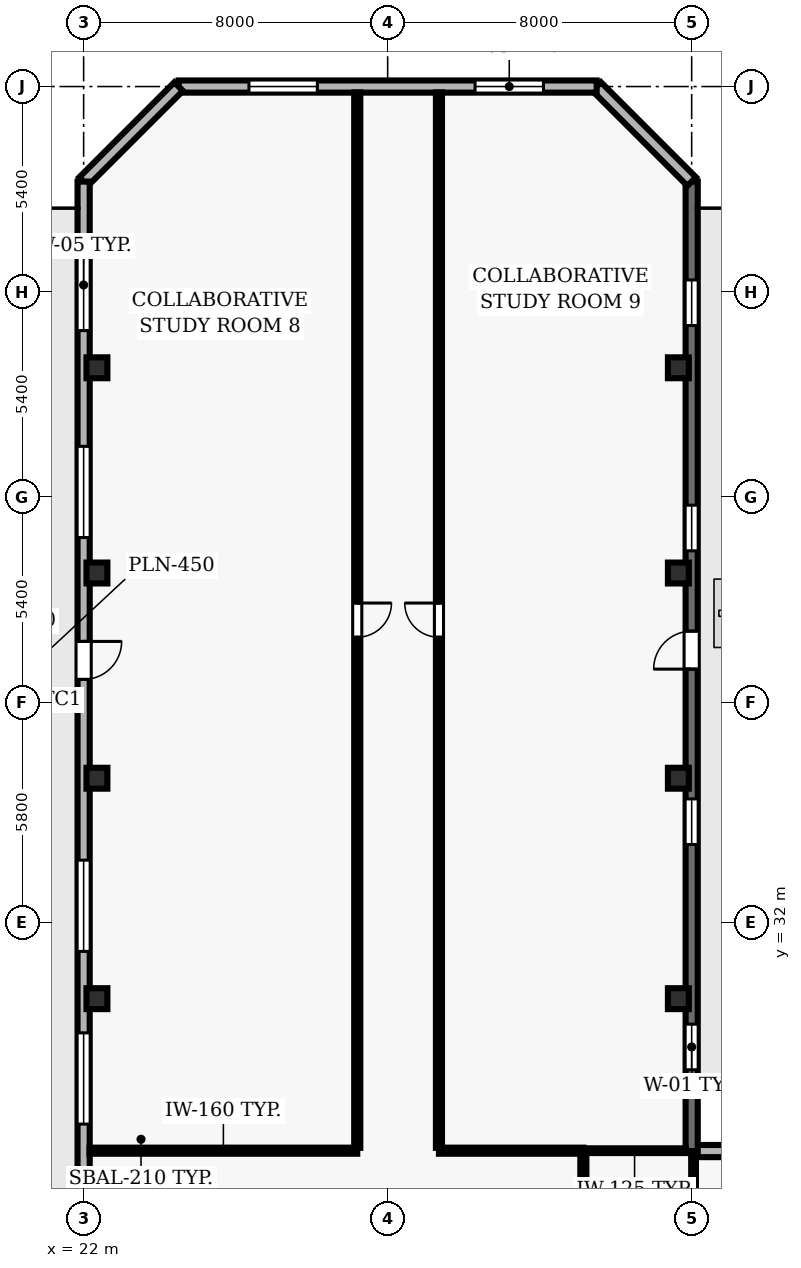
"""IFC4 building model, lengths in metres.
Left out: names, types, materials, properties, quantities, classifications, styles, units other than length and angle.
Written with IfcOpenShell. Run it as: python <this file> out.ifc"""

import sys

from ifc_helpers import new_model, si_unit, direction, frame, frame_2d, origin, origin_2d, place, context, subcontext, project, spatial, rectangle, hollow_rectangle, extrude, element, fill, save


model = new_model("IFC4")
c1 = context("Model", 3, precision=1e-05, world=origin(), true_north=direction((0.0, 1.0)))
c2 = subcontext(c1, "Body", "Model", "MODEL_VIEW")
j1 = project(units=[si_unit("LENGTHUNIT", "METRE"), si_unit("PLANEANGLEUNIT", "RADIAN")], contexts=[c1])
p1 = place(None, origin())
s1 = spatial("IfcSite", under=j1, at=p1, CompositionType="ELEMENT")
p2 = place(p1, origin())
s2 = spatial("IfcBuilding", under=s1, at=p2, CompositionType="ELEMENT")
p3 = place(p2, frame((0.0, 0.0, 70.0)))
s3 = spatial("IfcBuildingStorey", under=s2, at=p3, CompositionType="ELEMENT", Elevation=70.0)
for number, where, z_axis, x_axis in (
    (1, (22.35, 30.0, 0.0), (0.0, 0.0, 1.0), (1.0, 0.0, 0.0)),
    (2, (37.65, 30.0, 0.0), (0.0, 0.0, 1.0), (1.0, 0.0, 0.0)),
    (3, (22.35, 35.8, 0.0), (0.0, 0.0, 1.0), (1.0, 0.0, 0.0)),
    (4, (37.65, 35.8, 0.0), (0.0, 0.0, 1.0), (1.0, 0.0, 0.0)),
    (5, (22.35, 41.2, 0.0), (0.0, 0.0, 1.0), (1.0, 0.0, 0.0)),
    (6, (37.65, 41.2, 0.0), (0.0, 0.0, 1.0), (1.0, 0.0, 0.0)),
    (7, (22.35, 46.6, 0.0), (0.0, 0.0, 1.0), (1.0, 0.0, 0.0)),
    (8, (37.65, 46.6, 0.0), (0.0, 0.0, 1.0), (1.0, 0.0, 0.0)),
):
    element("IfcColumn", number, at=place(p3, frame(where, z_axis=z_axis, x_axis=x_axis)), inside=s3, PredefinedType="COLUMN", context=c2, shape_type="SweptSolid", body=[
        extrude(hollow_rectangle(XDim=0.55, YDim=0.55, WallThickness=0.025, at=origin_2d()), origin(), (0.0, 0.0, 1.0), 3.9),
    ])
p4 = place(p3, frame((48.5, 25.99, 0.0), z_axis=(0.0, 0.0, 1.0), x_axis=(-1.0, 0.0, 0.0)))
e9 = element("IfcWall", 9, at=p4, inside=s3, PredefinedType="SOLIDWALL", context=c2, shape_type="SweptSolid", body=[
    extrude(rectangle(XDim=10.5, YDim=0.32, at=frame_2d((5.25, 0.0))), origin(), (0.0, 0.0, 1.0), 3.69),
])
p5 = place(p4, frame((3.75, 0.0, 0.9)))
e10 = element("IfcOpeningElement", 10, at=p5, cuts=e9, PredefinedType="OPENING", context=c2, shape_type="SweptSolid", body=[
    extrude(rectangle(XDim=3.0, YDim=2.2, at=frame_2d((1.5, 1.1))), frame((0.0, 0.17, 0.0), z_axis=(0.0, -1.0, 0.0), x_axis=(1.0, 0.0, 0.0)), (0.0, 0.0, 1.0), 0.34),
])
p6 = place(p3, frame((38.0, 25.99, 0.0), z_axis=(0.0, 0.0, 1.0), x_axis=(0.0, 1.0, 0.0)))
e11 = element("IfcWall", 11, at=p6, inside=s3, PredefinedType="SOLIDWALL", context=c2, shape_type="SweptSolid", body=[
    extrude(rectangle(XDim=25.51, YDim=0.32, at=frame_2d((12.755, 0.0))), origin(), (0.0, 0.0, 1.0), 3.69),
])
p7 = place(p6, frame((12.681, 0.0, 0.0)))
e12 = element("IfcOpeningElement", 12, at=p7, cuts=e11, PredefinedType="OPENING", context=c2, shape_type="SweptSolid", body=[
    extrude(rectangle(XDim=1.0, YDim=2.2, at=frame_2d((0.5, 1.1))), frame((0.0, 0.17, 0.0), z_axis=(0.0, -1.0, 0.0), x_axis=(1.0, 0.0, 0.0)), (0.0, 0.0, 1.0), 0.34),
])
p8 = place(p6, frame((2.139, 0.0, 0.9)))
e13 = element("IfcOpeningElement", 13, at=p8, cuts=e11, PredefinedType="OPENING", context=c2, shape_type="SweptSolid", body=[
    extrude(rectangle(XDim=1.2, YDim=1.6, at=frame_2d((0.6, 0.8))), frame((0.0, 0.17, 0.0), z_axis=(0.0, -1.0, 0.0), x_axis=(1.0, 0.0, 0.0)), (0.0, 0.0, 1.0), 0.34),
])
p9 = place(p6, frame((8.066, 0.0, 0.9)))
e14 = element("IfcOpeningElement", 14, at=p9, cuts=e11, PredefinedType="OPENING", context=c2, shape_type="SweptSolid", body=[
    extrude(rectangle(XDim=1.2, YDim=1.6, at=frame_2d((0.6, 0.8))), frame((0.0, 0.17, 0.0), z_axis=(0.0, -1.0, 0.0), x_axis=(1.0, 0.0, 0.0)), (0.0, 0.0, 1.0), 0.34),
])
p10 = place(p6, frame((15.794, 0.0, 0.9)))
e15 = element("IfcOpeningElement", 15, at=p10, cuts=e11, PredefinedType="OPENING", context=c2, shape_type="SweptSolid", body=[
    extrude(rectangle(XDim=1.2, YDim=1.6, at=frame_2d((0.6, 0.8))), frame((0.0, 0.17, 0.0), z_axis=(0.0, -1.0, 0.0), x_axis=(1.0, 0.0, 0.0)), (0.0, 0.0, 1.0), 0.34),
])
p11 = place(p6, frame((21.721, 0.0, 0.9)))
e16 = element("IfcOpeningElement", 16, at=p11, cuts=e11, PredefinedType="OPENING", context=c2, shape_type="SweptSolid", body=[
    extrude(rectangle(XDim=1.2, YDim=1.6, at=frame_2d((0.6, 0.8))), frame((0.0, 0.17, 0.0), z_axis=(0.0, -1.0, 0.0), x_axis=(1.0, 0.0, 0.0)), (0.0, 0.0, 1.0), 0.34),
])
p12 = place(p3, frame((38.0, 51.5, 0.0), z_axis=(0.0, 0.0, 1.0), x_axis=(-0.707106781187, 0.707106781187, 0.0)))
e17 = element("IfcWall", 17, at=p12, inside=s3, PredefinedType="SOLIDWALL", context=c2, shape_type="SweptSolid", body=[
    extrude(rectangle(XDim=3.536, YDim=0.32, at=frame_2d((1.768, 0.0))), origin(), (0.0, 0.0, 1.0), 3.69),
])
p13 = place(p3, frame((35.5, 54.0, 0.0), z_axis=(0.0, 0.0, 1.0), x_axis=(-1.0, 0.0, 0.0)))
e18 = element("IfcWall", 18, at=p13, inside=s3, PredefinedType="SOLIDWALL", context=c2, shape_type="SweptSolid", body=[
    extrude(rectangle(XDim=11.0, YDim=0.32, at=frame_2d((5.5, 0.0))), origin(), (0.0, 0.0, 1.0), 3.69),
])
p14 = place(p13, frame((1.4, 0.0, 0.9)))
e19 = element("IfcOpeningElement", 19, at=p14, cuts=e18, PredefinedType="OPENING", context=c2, shape_type="SweptSolid", body=[
    extrude(rectangle(XDim=1.8, YDim=1.6, at=frame_2d((0.9, 0.8))), frame((0.0, 0.17, 0.0), z_axis=(0.0, -1.0, 0.0), x_axis=(1.0, 0.0, 0.0)), (0.0, 0.0, 1.0), 0.34),
])
p15 = place(p13, frame((7.35, 0.0, 0.9)))
e20 = element("IfcOpeningElement", 20, at=p15, cuts=e18, PredefinedType="OPENING", context=c2, shape_type="SweptSolid", body=[
    extrude(rectangle(XDim=1.8, YDim=1.6, at=frame_2d((0.9, 0.8))), frame((0.0, 0.17, 0.0), z_axis=(0.0, -1.0, 0.0), x_axis=(1.0, 0.0, 0.0)), (0.0, 0.0, 1.0), 0.34),
])
p16 = place(p3, frame((24.5, 54.0, 0.0), z_axis=(0.0, 0.0, 1.0), x_axis=(-0.707106781187, -0.707106781187, 0.0)))
e21 = element("IfcWall", 21, at=p16, inside=s3, PredefinedType="SOLIDWALL", context=c2, shape_type="SweptSolid", body=[
    extrude(rectangle(XDim=3.536, YDim=0.32, at=frame_2d((1.768, 0.0))), origin(), (0.0, 0.0, 1.0), 3.69),
])
p17 = place(p3, frame((22.0, 51.5, 0.0), z_axis=(0.0, 0.0, 1.0), x_axis=(0.0, -1.0, 0.0)))
e22 = element("IfcWall", 22, at=p17, inside=s3, PredefinedType="SOLIDWALL", context=c2, shape_type="SweptSolid", body=[
    extrude(rectangle(XDim=49.0, YDim=0.32, at=frame_2d((24.5, 0.0))), origin(), (0.0, 0.0, 1.0), 3.69),
])
p18 = place(p17, frame((12.1, 0.0, 0.0)))
e23 = element("IfcOpeningElement", 23, at=p18, cuts=e22, PredefinedType="OPENING", context=c2, shape_type="SweptSolid", body=[
    extrude(rectangle(XDim=1.0, YDim=2.2, at=frame_2d((0.5, 1.1))), frame((0.0, 0.17, 0.0), z_axis=(0.0, -1.0, 0.0), x_axis=(1.0, 0.0, 0.0)), (0.0, 0.0, 1.0), 0.34),
])
p19 = place(p17, frame((1.522, 0.0, 0.9)))
e24 = element("IfcOpeningElement", 24, at=p19, cuts=e22, PredefinedType="OPENING", context=c2, shape_type="SweptSolid", body=[
    extrude(rectangle(XDim=2.4, YDim=1.6, at=frame_2d((1.2, 0.8))), frame((0.0, 0.17, 0.0), z_axis=(0.0, -1.0, 0.0), x_axis=(1.0, 0.0, 0.0)), (0.0, 0.0, 1.0), 0.34),
])
p20 = place(p17, frame((6.967, 0.0, 0.9)))
e25 = element("IfcOpeningElement", 25, at=p20, cuts=e22, PredefinedType="OPENING", context=c2, shape_type="SweptSolid", body=[
    extrude(rectangle(XDim=2.4, YDim=1.6, at=frame_2d((1.2, 0.8))), frame((0.0, 0.17, 0.0), z_axis=(0.0, -1.0, 0.0), x_axis=(1.0, 0.0, 0.0)), (0.0, 0.0, 1.0), 0.34),
])
p21 = place(p17, frame((17.856, 0.0, 0.9)))
e26 = element("IfcOpeningElement", 26, at=p21, cuts=e22, PredefinedType="OPENING", context=c2, shape_type="SweptSolid", body=[
    extrude(rectangle(XDim=2.4, YDim=1.6, at=frame_2d((1.2, 0.8))), frame((0.0, 0.17, 0.0), z_axis=(0.0, -1.0, 0.0), x_axis=(1.0, 0.0, 0.0)), (0.0, 0.0, 1.0), 0.34),
])
p22 = place(p17, frame((22.4, 0.0, 0.9)))
e27 = element("IfcOpeningElement", 27, at=p22, cuts=e22, PredefinedType="OPENING", context=c2, shape_type="SweptSolid", body=[
    extrude(rectangle(XDim=2.4, YDim=1.6, at=frame_2d((1.2, 0.8))), frame((0.0, 0.17, 0.0), z_axis=(0.0, -1.0, 0.0), x_axis=(1.0, 0.0, 0.0)), (0.0, 0.0, 1.0), 0.34),
])
p23 = place(p17, frame((29.194, 0.0, 0.9)))
e28 = element("IfcOpeningElement", 28, at=p23, cuts=e22, PredefinedType="OPENING", context=c2, shape_type="SweptSolid", body=[
    extrude(rectangle(XDim=2.4, YDim=1.6, at=frame_2d((1.2, 0.8))), frame((0.0, 0.17, 0.0), z_axis=(0.0, -1.0, 0.0), x_axis=(1.0, 0.0, 0.0)), (0.0, 0.0, 1.0), 0.34),
])
p24 = place(p17, frame((33.289, 0.0, 0.9)))
e29 = element("IfcOpeningElement", 29, at=p24, cuts=e22, PredefinedType="OPENING", context=c2, shape_type="SweptSolid", body=[
    extrude(rectangle(XDim=2.4, YDim=1.6, at=frame_2d((1.2, 0.8))), frame((0.0, 0.17, 0.0), z_axis=(0.0, -1.0, 0.0), x_axis=(1.0, 0.0, 0.0)), (0.0, 0.0, 1.0), 0.34),
])
p25 = place(p17, frame((39.633, 0.0, 0.9)))
e30 = element("IfcOpeningElement", 30, at=p25, cuts=e22, PredefinedType="OPENING", context=c2, shape_type="SweptSolid", body=[
    extrude(rectangle(XDim=2.4, YDim=1.6, at=frame_2d((1.2, 0.8))), frame((0.0, 0.17, 0.0), z_axis=(0.0, -1.0, 0.0), x_axis=(1.0, 0.0, 0.0)), (0.0, 0.0, 1.0), 0.34),
])
p26 = place(p3, frame((29.2, 26.0, 0.0), z_axis=(0.0, 0.0, 1.0), x_axis=(-1.0, 0.0, 0.0)))
e31 = element("IfcWall", 31, at=p26, inside=s3, PredefinedType="PARTITIONING", context=c2, shape_type="SweptSolid", body=[
    extrude(rectangle(XDim=7.045, YDim=0.16, at=frame_2d((3.522, 0.0))), origin(), (0.0, 0.0, 1.0), 3.69),
])
p27 = place(p3, frame((35.15, 26.0, 0.0), z_axis=(0.0, 0.0, 1.0), x_axis=(-1.0, 0.0, 0.0)))
e32 = element("IfcWall", 32, at=p27, inside=s3, PredefinedType="PARTITIONING", context=c2, shape_type="SweptSolid", body=[
    extrude(rectangle(XDim=3.8, YDim=0.16, at=frame_2d((1.9, 0.0))), origin(), (0.0, 0.0, 1.0), 3.69),
])
p28 = place(p3, frame((35.15, 26.0, 0.0), z_axis=(0.0, 0.0, 1.0), x_axis=(1.0, 0.0, 0.0)))
e33 = element("IfcWall", 33, at=p28, inside=s3, PredefinedType="PARTITIONING", context=c2, shape_type="SweptSolid", body=[
    extrude(rectangle(XDim=2.695, YDim=0.125, at=frame_2d((1.348, 0.0))), origin(), (0.0, 0.0, 1.0), 3.69),
])
p29 = place(p3, frame((29.2, 53.845, 0.0), z_axis=(0.0, 0.0, 1.0), x_axis=(0.0, -1.0, 0.0)))
e34 = element("IfcWall", 34, at=p29, inside=s3, PredefinedType="PARTITIONING", context=c2, shape_type="SweptSolid", body=[
    extrude(rectangle(XDim=27.77, YDim=0.16, at=frame_2d((13.885, 0.0))), origin(), (0.0, 0.0, 1.0), 3.69),
])
p30 = place(p29, frame((13.435, 0.0, 0.0)))
e35 = element("IfcOpeningElement", 35, at=p30, cuts=e34, PredefinedType="OPENING", context=c2, shape_type="SweptSolid", body=[
    extrude(rectangle(XDim=0.9, YDim=2.1, at=frame_2d((0.45, 1.05))), frame((0.0, 0.09, 0.0), z_axis=(0.0, -1.0, 0.0), x_axis=(1.0, 0.0, 0.0)), (0.0, 0.0, 1.0), 0.18),
])
p31 = place(p3, frame((31.35, 26.075, 0.0), z_axis=(0.0, 0.0, 1.0), x_axis=(0.0, 1.0, 0.0)))
e36 = element("IfcWall", 36, at=p31, inside=s3, PredefinedType="PARTITIONING", context=c2, shape_type="SweptSolid", body=[
    extrude(rectangle(XDim=27.77, YDim=0.16, at=frame_2d((13.885, 0.0))), origin(), (0.0, 0.0, 1.0), 3.69),
])
p32 = place(p31, frame((13.435, 0.0, 0.0)))
e37 = element("IfcOpeningElement", 37, at=p32, cuts=e36, PredefinedType="OPENING", context=c2, shape_type="SweptSolid", body=[
    extrude(rectangle(XDim=0.9, YDim=2.1, at=frame_2d((0.45, 1.05))), frame((0.0, 0.09, 0.0), z_axis=(0.0, -1.0, 0.0), x_axis=(1.0, 0.0, 0.0)), (0.0, 0.0, 1.0), 0.18),
])
p33 = place(p3, frame((35.15, 24.07, 0.0), z_axis=(0.0, 0.0, 1.0), x_axis=(0.0, 1.0, 0.0)))
e38 = element("IfcWall", 38, at=p33, inside=s3, PredefinedType="PARTITIONING", context=c2, shape_type="SweptSolid", body=[
    extrude(rectangle(XDim=1.855, YDim=0.16, at=frame_2d((0.927, 0.0))), origin(), (0.0, 0.0, 1.0), 3.69),
])
p34 = place(p3, frame((38.05, 25.835, 0.0), z_axis=(0.0, 0.0, 1.0), x_axis=(0.0, -1.0, 0.0)))
e39 = element("IfcWall", 39, at=p34, inside=s3, PredefinedType="PARTITIONING", context=c2, shape_type="SweptSolid", body=[
    extrude(rectangle(XDim=1.785, YDim=0.125, at=frame_2d((0.893, 0.0))), origin(), (0.0, 0.0, 1.0), 2.995),
])
p35 = place(p7, origin())
e40 = element("IfcDoor", 40, at=p35, inside=s3, OperationType="SINGLE_SWING_LEFT", PredefinedType="DOOR", context=c2, shape_type="SweptSolid", body=[
    extrude(rectangle(XDim=1.0, YDim=2.2, at=frame_2d((0.5, 1.1))), frame((0.0, 0.025, 0.0), z_axis=(0.0, -1.0, 0.0), x_axis=(1.0, 0.0, 0.0)), (0.0, 0.0, 1.0), 0.05),
])
fill(e12, e40)
p36 = place(p8, origin())
e41 = element("IfcWindow", 41, at=p36, inside=s3, PartitioningType="SINGLE_PANEL", PredefinedType="WINDOW", context=c2, shape_type="SweptSolid", body=[
    extrude(rectangle(XDim=1.2, YDim=1.6, at=frame_2d((0.6, 0.8))), frame((0.0, 0.03, 0.0), z_axis=(0.0, -1.0, 0.0), x_axis=(1.0, 0.0, 0.0)), (0.0, 0.0, 1.0), 0.06),
])
fill(e13, e41)
p37 = place(p9, origin())
e42 = element("IfcWindow", 42, at=p37, inside=s3, PartitioningType="SINGLE_PANEL", PredefinedType="WINDOW", context=c2, shape_type="SweptSolid", body=[
    extrude(rectangle(XDim=1.2, YDim=1.6, at=frame_2d((0.6, 0.8))), frame((0.0, 0.03, 0.0), z_axis=(0.0, -1.0, 0.0), x_axis=(1.0, 0.0, 0.0)), (0.0, 0.0, 1.0), 0.06),
])
fill(e14, e42)
p38 = place(p10, origin())
e43 = element("IfcWindow", 43, at=p38, inside=s3, PartitioningType="SINGLE_PANEL", PredefinedType="WINDOW", context=c2, shape_type="SweptSolid", body=[
    extrude(rectangle(XDim=1.2, YDim=1.6, at=frame_2d((0.6, 0.8))), frame((0.0, 0.03, 0.0), z_axis=(0.0, -1.0, 0.0), x_axis=(1.0, 0.0, 0.0)), (0.0, 0.0, 1.0), 0.06),
])
fill(e15, e43)
p39 = place(p11, origin())
e44 = element("IfcWindow", 44, at=p39, inside=s3, PartitioningType="SINGLE_PANEL", PredefinedType="WINDOW", context=c2, shape_type="SweptSolid", body=[
    extrude(rectangle(XDim=1.2, YDim=1.6, at=frame_2d((0.6, 0.8))), frame((0.0, 0.03, 0.0), z_axis=(0.0, -1.0, 0.0), x_axis=(1.0, 0.0, 0.0)), (0.0, 0.0, 1.0), 0.06),
])
fill(e16, e44)
p40 = place(p14, origin())
e45 = element("IfcWindow", 45, at=p40, inside=s3, PartitioningType="SINGLE_PANEL", PredefinedType="WINDOW", context=c2, shape_type="SweptSolid", body=[
    extrude(rectangle(XDim=1.8, YDim=1.6, at=frame_2d((0.9, 0.8))), frame((0.0, 0.03, 0.0), z_axis=(0.0, -1.0, 0.0), x_axis=(1.0, 0.0, 0.0)), (0.0, 0.0, 1.0), 0.06),
])
fill(e19, e45)
p41 = place(p15, origin())
e46 = element("IfcWindow", 46, at=p41, inside=s3, PartitioningType="SINGLE_PANEL", PredefinedType="WINDOW", context=c2, shape_type="SweptSolid", body=[
    extrude(rectangle(XDim=1.8, YDim=1.6, at=frame_2d((0.9, 0.8))), frame((0.0, 0.03, 0.0), z_axis=(0.0, -1.0, 0.0), x_axis=(1.0, 0.0, 0.0)), (0.0, 0.0, 1.0), 0.06),
])
fill(e20, e46)
p42 = place(p18, origin())
e47 = element("IfcDoor", 47, at=p42, inside=s3, OperationType="SINGLE_SWING_LEFT", PredefinedType="DOOR", context=c2, shape_type="SweptSolid", body=[
    extrude(rectangle(XDim=1.0, YDim=2.2, at=frame_2d((0.5, 1.1))), frame((0.0, 0.025, 0.0), z_axis=(0.0, -1.0, 0.0), x_axis=(1.0, 0.0, 0.0)), (0.0, 0.0, 1.0), 0.05),
])
fill(e23, e47)
p43 = place(p19, origin())
e48 = element("IfcWindow", 48, at=p43, inside=s3, PartitioningType="SINGLE_PANEL", PredefinedType="WINDOW", context=c2, shape_type="SweptSolid", body=[
    extrude(rectangle(XDim=2.4, YDim=1.6, at=frame_2d((1.2, 0.8))), frame((0.0, 0.03, 0.0), z_axis=(0.0, -1.0, 0.0), x_axis=(1.0, 0.0, 0.0)), (0.0, 0.0, 1.0), 0.06),
])
fill(e24, e48)
p44 = place(p20, origin())
e49 = element("IfcWindow", 49, at=p44, inside=s3, PartitioningType="SINGLE_PANEL", PredefinedType="WINDOW", context=c2, shape_type="SweptSolid", body=[
    extrude(rectangle(XDim=2.4, YDim=1.6, at=frame_2d((1.2, 0.8))), frame((0.0, 0.03, 0.0), z_axis=(0.0, -1.0, 0.0), x_axis=(1.0, 0.0, 0.0)), (0.0, 0.0, 1.0), 0.06),
])
fill(e25, e49)
p45 = place(p21, origin())
e50 = element("IfcWindow", 50, at=p45, inside=s3, PartitioningType="SINGLE_PANEL", PredefinedType="WINDOW", context=c2, shape_type="SweptSolid", body=[
    extrude(rectangle(XDim=2.4, YDim=1.6, at=frame_2d((1.2, 0.8))), frame((0.0, 0.03, 0.0), z_axis=(0.0, -1.0, 0.0), x_axis=(1.0, 0.0, 0.0)), (0.0, 0.0, 1.0), 0.06),
])
fill(e26, e50)
p46 = place(p22, origin())
e51 = element("IfcWindow", 51, at=p46, inside=s3, PartitioningType="SINGLE_PANEL", PredefinedType="WINDOW", context=c2, shape_type="SweptSolid", body=[
    extrude(rectangle(XDim=2.4, YDim=1.6, at=frame_2d((1.2, 0.8))), frame((0.0, 0.03, 0.0), z_axis=(0.0, -1.0, 0.0), x_axis=(1.0, 0.0, 0.0)), (0.0, 0.0, 1.0), 0.06),
])
fill(e27, e51)
p47 = place(p30, origin())
e52 = element("IfcDoor", 52, at=p47, inside=s3, OperationType="SINGLE_SWING_LEFT", PredefinedType="DOOR", context=c2, shape_type="SweptSolid", body=[
    extrude(rectangle(XDim=0.9, YDim=2.1, at=frame_2d((0.45, 1.05))), frame((0.0, 0.025, 0.0), z_axis=(0.0, -1.0, 0.0), x_axis=(1.0, 0.0, 0.0)), (0.0, 0.0, 1.0), 0.05),
])
fill(e35, e52)
p48 = place(p32, origin())
e53 = element("IfcDoor", 53, at=p48, inside=s3, OperationType="SINGLE_SWING_RIGHT", PredefinedType="DOOR", context=c2, shape_type="SweptSolid", body=[
    extrude(rectangle(XDim=0.9, YDim=2.1, at=frame_2d((0.45, 1.05))), frame((0.0, 0.025, 0.0), z_axis=(0.0, -1.0, 0.0), x_axis=(1.0, 0.0, 0.0)), (0.0, 0.0, 1.0), 0.05),
])
fill(e37, e53)
save(model, sys.argv[1])
